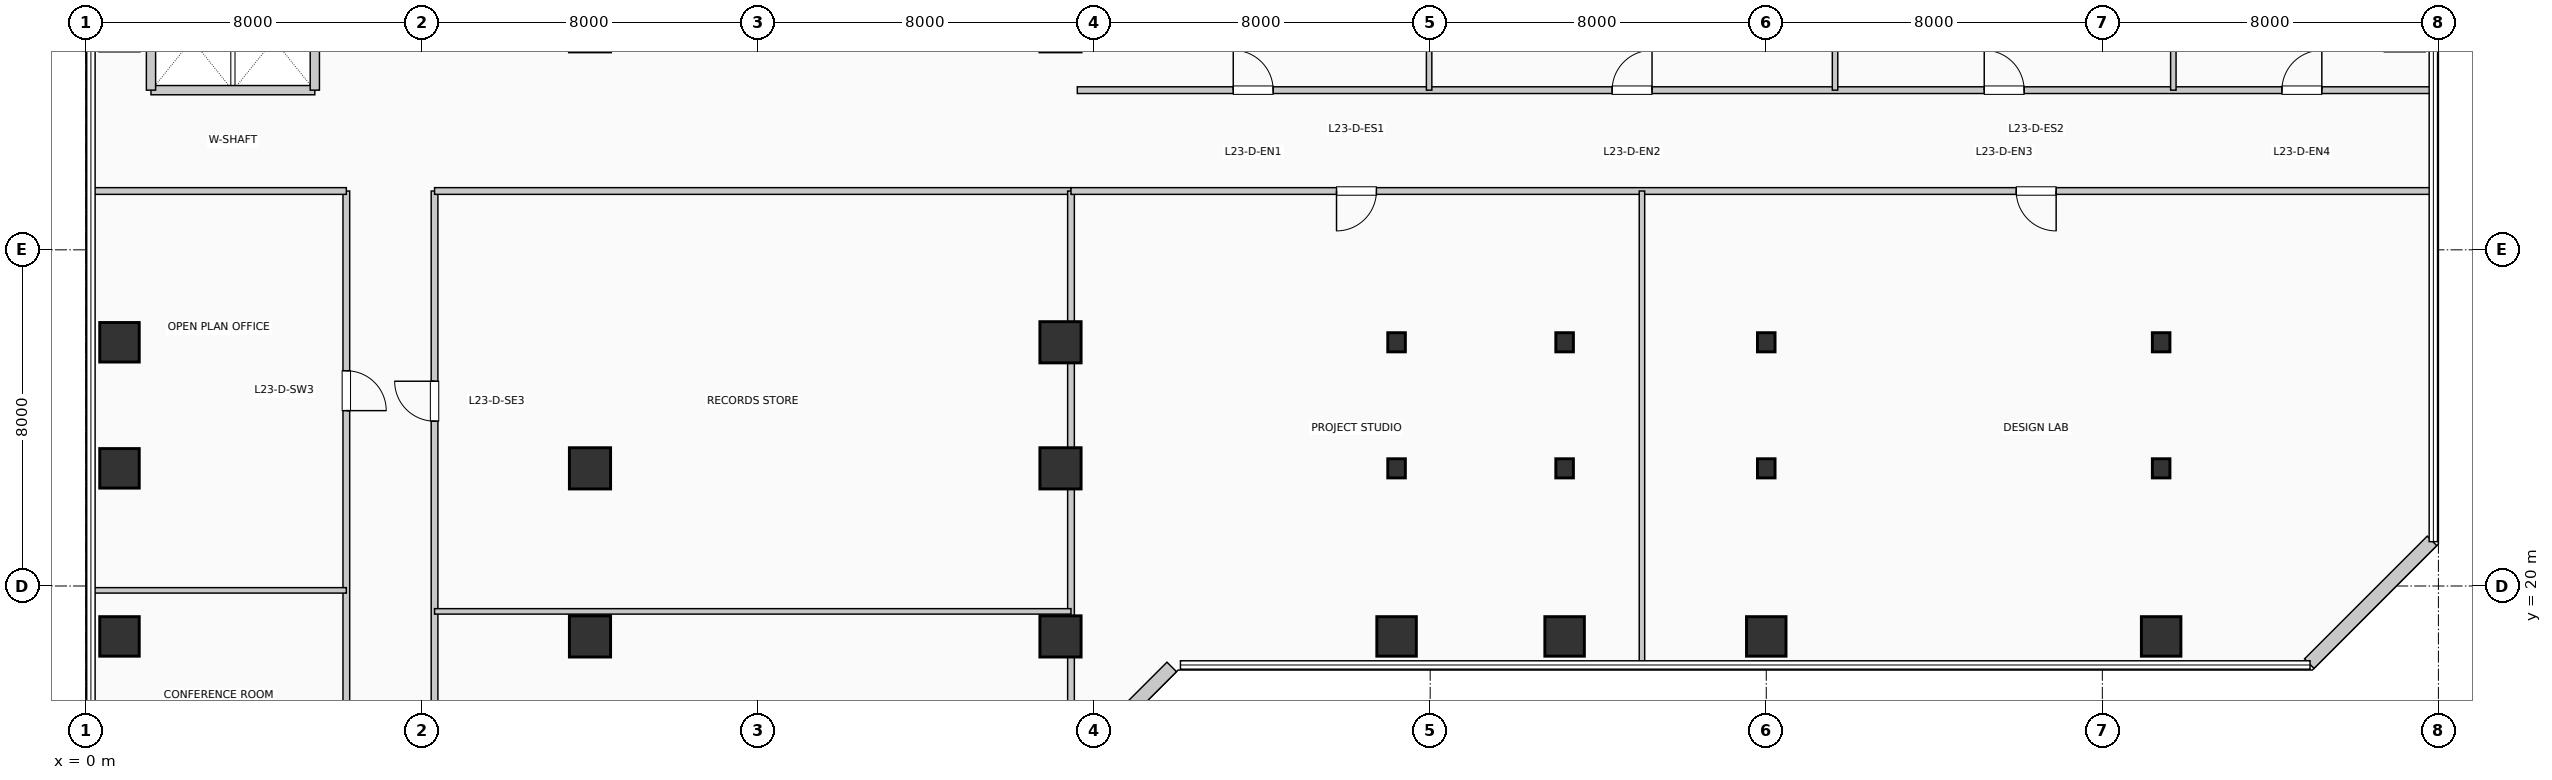
"""IFC4 building model, lengths in metres.
Left out: names, types, materials, properties, quantities, classifications, styles, units other than length and angle.
Written with IfcOpenShell. Run it as: python <this file> out.ifc"""

import sys

from ifc_helpers import new_model, si_unit, direction, frame, frame_2d, origin, origin_2d, place, context, subcontext, project, spatial, rectangle, i_section, extrude, element, fill, save


model = new_model("IFC4")
c1 = context("Model", 3, precision=1e-05, world=origin(), true_north=direction((0.0, 1.0)))
c2 = subcontext(c1, "Body", "Model", "MODEL_VIEW")
j1 = project(units=[si_unit("LENGTHUNIT", "METRE"), si_unit("PLANEANGLEUNIT", "RADIAN")], contexts=[c1])
p1 = place(None, origin())
s1 = spatial("IfcSite", under=j1, at=p1, CompositionType="ELEMENT")
p2 = place(p1, origin())
s2 = spatial("IfcBuilding", under=s1, at=p2, CompositionType="ELEMENT")
p3 = place(p2, frame((0.0, 0.0, 98.67)))
s3 = spatial("IfcBuildingStorey", under=s2, at=p3, CompositionType="ELEMENT", Elevation=98.67)
for number, where, z_axis, x_axis in (
    (1, (0.8, 18.8, 0.0), (0.0, 0.0, 1.0), (1.0, 0.0, 0.0)),
    (2, (0.8, 22.8, 0.0), (0.0, 0.0, 1.0), (1.0, 0.0, 0.0)),
    (3, (0.8, 25.8, 0.0), (0.0, 0.0, 1.0), (1.0, 0.0, 0.0)),
):
    element("IfcColumn", number, at=place(p3, frame(where, z_axis=z_axis, x_axis=x_axis)), inside=s3, PredefinedType="COLUMN", context=c2, shape_type="SweptSolid", body=[
        extrude(rectangle(XDim=0.94, YDim=0.94, at=origin_2d()), origin(), (0.0, 0.0, 1.0), 3.96),
    ])
for number, where, z_axis, x_axis in (
    (4, (12.0, 18.8, 0.0), (0.0, 0.0, 1.0), (1.0, 0.0, 0.0)),
    (5, (12.0, 22.8, 0.0), (0.0, 0.0, 1.0), (1.0, 0.0, 0.0)),
    (6, (23.2, 18.8, 0.0), (0.0, 0.0, 1.0), (1.0, 0.0, 0.0)),
    (7, (23.2, 22.8, 0.0), (0.0, 0.0, 1.0), (1.0, 0.0, 0.0)),
    (8, (23.2, 25.8, 0.0), (0.0, 0.0, 1.0), (1.0, 0.0, 0.0)),
):
    element("IfcColumn", number, at=place(p3, frame(where, z_axis=z_axis, x_axis=x_axis)), inside=s3, PredefinedType="COLUMN", context=c2, shape_type="SweptSolid", body=[
        extrude(rectangle(XDim=0.98, YDim=0.98, at=origin_2d()), origin(), (0.0, 0.0, 1.0), 3.96),
    ])
p4 = place(p3, frame((31.2, 18.8, 0.0), z_axis=(0.0, 0.0, 1.0), x_axis=(1.0, 0.0, 0.0)))
e9 = element("IfcColumn", 9, at=p4, inside=s3, PredefinedType="COLUMN", context=c2, shape_type="SweptSolid", body=[
    extrude(rectangle(XDim=0.94, YDim=0.94, at=origin_2d()), origin(), (0.0, 0.0, 1.0), 3.96),
])
for number, where, z_axis, x_axis in (
    (10, (31.2, 22.8, 0.0), (0.0, 0.0, 1.0), (1.0, 0.0, 0.0)),
    (11, (31.2, 25.8, 0.0), (0.0, 0.0, 1.0), (1.0, 0.0, 0.0)),
):
    element("IfcColumn", number, at=place(p3, frame(where, z_axis=z_axis, x_axis=x_axis)), inside=s3, PredefinedType="COLUMN", context=c2, shape_type="SweptSolid", body=[
        extrude(i_section(OverallWidth=0.418, OverallDepth=0.455, WebThickness=0.032, FlangeThickness=0.051, at=origin_2d()), origin(), (0.0, 0.0, 1.0), 3.96),
    ])
p5 = place(p3, frame((35.2, 18.8, 0.0), z_axis=(0.0, 0.0, 1.0), x_axis=(1.0, 0.0, 0.0)))
e12 = element("IfcColumn", 12, at=p5, inside=s3, PredefinedType="COLUMN", context=c2, shape_type="SweptSolid", body=[
    extrude(rectangle(XDim=0.94, YDim=0.94, at=origin_2d()), origin(), (0.0, 0.0, 1.0), 3.96),
])
for number, where, z_axis, x_axis in (
    (13, (35.2, 22.8, 0.0), (0.0, 0.0, 1.0), (1.0, 0.0, 0.0)),
    (14, (35.2, 25.8, 0.0), (0.0, 0.0, 1.0), (1.0, 0.0, 0.0)),
):
    element("IfcColumn", number, at=place(p3, frame(where, z_axis=z_axis, x_axis=x_axis)), inside=s3, PredefinedType="COLUMN", context=c2, shape_type="SweptSolid", body=[
        extrude(i_section(OverallWidth=0.418, OverallDepth=0.455, WebThickness=0.032, FlangeThickness=0.051, at=origin_2d()), origin(), (0.0, 0.0, 1.0), 3.96),
    ])
p6 = place(p3, frame((40.0, 18.8, 0.0), z_axis=(0.0, 0.0, 1.0), x_axis=(1.0, 0.0, 0.0)))
e15 = element("IfcColumn", 15, at=p6, inside=s3, PredefinedType="COLUMN", context=c2, shape_type="SweptSolid", body=[
    extrude(rectangle(XDim=0.94, YDim=0.94, at=origin_2d()), origin(), (0.0, 0.0, 1.0), 3.96),
])
for number, where, z_axis, x_axis in (
    (16, (40.0, 22.8, 0.0), (0.0, 0.0, 1.0), (1.0, 0.0, 0.0)),
    (17, (40.0, 25.8, 0.0), (0.0, 0.0, 1.0), (1.0, 0.0, 0.0)),
):
    element("IfcColumn", number, at=place(p3, frame(where, z_axis=z_axis, x_axis=x_axis)), inside=s3, PredefinedType="COLUMN", context=c2, shape_type="SweptSolid", body=[
        extrude(i_section(OverallWidth=0.418, OverallDepth=0.455, WebThickness=0.032, FlangeThickness=0.051, at=origin_2d()), origin(), (0.0, 0.0, 1.0), 3.96),
    ])
p7 = place(p3, frame((49.4, 18.8, 0.0), z_axis=(0.0, 0.0, 1.0), x_axis=(1.0, 0.0, 0.0)))
e18 = element("IfcColumn", 18, at=p7, inside=s3, PredefinedType="COLUMN", context=c2, shape_type="SweptSolid", body=[
    extrude(rectangle(XDim=0.94, YDim=0.94, at=origin_2d()), origin(), (0.0, 0.0, 1.0), 3.96),
])
for number, where, z_axis, x_axis in (
    (19, (49.4, 22.8, 0.0), (0.0, 0.0, 1.0), (1.0, 0.0, 0.0)),
    (20, (49.4, 25.8, 0.0), (0.0, 0.0, 1.0), (1.0, 0.0, 0.0)),
):
    element("IfcColumn", number, at=place(p3, frame(where, z_axis=z_axis, x_axis=x_axis)), inside=s3, PredefinedType="COLUMN", context=c2, shape_type="SweptSolid", body=[
        extrude(i_section(OverallWidth=0.418, OverallDepth=0.455, WebThickness=0.032, FlangeThickness=0.051, at=origin_2d()), origin(), (0.0, 0.0, 1.0), 3.96),
    ])
p8 = place(p3, frame((23.926, 16.152, 0.0), z_axis=(0.0, 0.0, 1.0), x_axis=(0.707106781187, 0.707106781187, 0.0)))
e21 = element("IfcWall", 21, at=p8, inside=s3, PredefinedType="SOLIDWALL", context=c2, shape_type="SweptSolid", body=[
    extrude(rectangle(XDim=2.718, YDim=0.32, at=frame_2d((1.359, 0.0))), origin(), (0.0, 0.0, 1.0), 3.71),
])
p9 = place(p3, frame((52.926, 18.152, 0.0), z_axis=(0.0, 0.0, 1.0), x_axis=(0.707106781187, 0.707106781187, 0.0)))
e22 = element("IfcWall", 22, at=p9, inside=s3, PredefinedType="SOLIDWALL", context=c2, shape_type="SweptSolid", body=[
    extrude(rectangle(XDim=4.133, YDim=0.32, at=frame_2d((2.066, 0.0))), origin(), (0.0, 0.0, 1.0), 3.71),
])
p10 = place(p3, frame((1.55, 31.8, 0.0), z_axis=(0.0, 0.0, 1.0), x_axis=(1.0, 0.0, 0.0)))
e23 = element("IfcWall", 23, at=p10, inside=s3, PredefinedType="PARTITIONING", context=c2, shape_type="SweptSolid", body=[
    extrude(rectangle(XDim=3.9, YDim=0.22, at=frame_2d((1.95, 0.0))), origin(), (0.0, 0.0, 1.0), 3.71),
])
for number, where, z_axis, x_axis in (
    (24, (1.55, 31.8, 0.0), (0.0, 0.0, 1.0), (0.0, 1.0, 0.0)),
    (25, (5.45, 31.8, 0.0), (0.0, 0.0, 1.0), (0.0, 1.0, 0.0)),
):
    element("IfcWall", number, at=place(p3, frame(where, z_axis=z_axis, x_axis=x_axis)), inside=s3, PredefinedType="PARTITIONING", context=c2, shape_type="SweptSolid", body=[
        extrude(rectangle(XDim=2.38, YDim=0.22, at=frame_2d((1.19, 0.0))), origin(), (0.0, 0.0, 1.0), 3.71),
    ])
p11 = place(p3, frame((6.2, 4.39, 0.0), z_axis=(0.0, 0.0, 1.0), x_axis=(0.0, 1.0, 0.0)))
e26 = element("IfcWall", 26, at=p11, inside=s3, PredefinedType="PARTITIONING", context=c2, shape_type="SweptSolid", body=[
    extrude(rectangle(XDim=25.01, YDim=0.16, at=frame_2d((12.505, 0.0))), origin(), (0.0, 0.0, 1.0), 3.71),
])
p12 = place(p11, frame((4.227, 0.0, 0.0), z_axis=(0.0, 0.0, 1.0), x_axis=(-1.0, 0.0, 0.0)))
e27 = element("IfcOpeningElement", 27, at=p12, cuts=e26, PredefinedType="OPENING", context=c2, shape_type="SweptSolid", body=[
    extrude(rectangle(XDim=0.95, YDim=2.15, at=frame_2d((0.475, 1.075))), frame((0.0, 0.09, 0.0), z_axis=(0.0, -1.0, 0.0), x_axis=(1.0, 0.0, 0.0)), (0.0, 0.0, 1.0), 0.18),
])
p13 = place(p11, frame((11.979, 0.0, 0.0), z_axis=(0.0, 0.0, 1.0), x_axis=(-1.0, 0.0, 0.0)))
e28 = element("IfcOpeningElement", 28, at=p13, cuts=e26, PredefinedType="OPENING", context=c2, shape_type="SweptSolid", body=[
    extrude(rectangle(XDim=0.95, YDim=2.15, at=frame_2d((0.475, 1.075))), frame((0.0, 0.09, 0.0), z_axis=(0.0, -1.0, 0.0), x_axis=(1.0, 0.0, 0.0)), (0.0, 0.0, 1.0), 0.18),
])
p14 = place(p11, frame((20.733, 0.0, 0.0), z_axis=(0.0, 0.0, 1.0), x_axis=(-1.0, 0.0, 0.0)))
e29 = element("IfcOpeningElement", 29, at=p14, cuts=e26, PredefinedType="OPENING", context=c2, shape_type="SweptSolid", body=[
    extrude(rectangle(XDim=0.95, YDim=2.15, at=frame_2d((0.475, 1.075))), frame((0.0, 0.09, 0.0), z_axis=(0.0, -1.0, 0.0), x_axis=(1.0, 0.0, 0.0)), (0.0, 0.0, 1.0), 0.18),
])
p15 = place(p3, frame((8.3, 4.39, 0.0), z_axis=(0.0, 0.0, 1.0), x_axis=(0.0, 1.0, 0.0)))
e30 = element("IfcWall", 30, at=p15, inside=s3, PredefinedType="PARTITIONING", context=c2, shape_type="SweptSolid", body=[
    extrude(rectangle(XDim=25.01, YDim=0.16, at=frame_2d((12.505, 0.0))), origin(), (0.0, 0.0, 1.0), 3.71),
])
p16 = place(p15, frame((3.026, 0.0, 0.0)))
e31 = element("IfcOpeningElement", 31, at=p16, cuts=e30, PredefinedType="OPENING", context=c2, shape_type="SweptSolid", body=[
    extrude(rectangle(XDim=0.95, YDim=2.15, at=frame_2d((0.475, 1.075))), frame((0.0, 0.09, 0.0), z_axis=(0.0, -1.0, 0.0), x_axis=(1.0, 0.0, 0.0)), (0.0, 0.0, 1.0), 0.18),
])
p17 = place(p15, frame((10.529, 0.0, 0.0)))
e32 = element("IfcOpeningElement", 32, at=p17, cuts=e30, PredefinedType="OPENING", context=c2, shape_type="SweptSolid", body=[
    extrude(rectangle(XDim=0.95, YDim=2.15, at=frame_2d((0.475, 1.075))), frame((0.0, 0.09, 0.0), z_axis=(0.0, -1.0, 0.0), x_axis=(1.0, 0.0, 0.0)), (0.0, 0.0, 1.0), 0.18),
])
p18 = place(p15, frame((19.533, 0.0, 0.0)))
e33 = element("IfcOpeningElement", 33, at=p18, cuts=e30, PredefinedType="OPENING", context=c2, shape_type="SweptSolid", body=[
    extrude(rectangle(XDim=0.95, YDim=2.15, at=frame_2d((0.475, 1.075))), frame((0.0, 0.09, 0.0), z_axis=(0.0, -1.0, 0.0), x_axis=(1.0, 0.0, 0.0)), (0.0, 0.0, 1.0), 0.18),
])
p19 = place(p3, frame((0.19, 29.4, 0.0), z_axis=(0.0, 0.0, 1.0), x_axis=(1.0, 0.0, 0.0)))
e34 = element("IfcWall", 34, at=p19, inside=s3, PredefinedType="PARTITIONING", context=c2, shape_type="SweptSolid", body=[
    extrude(rectangle(XDim=6.01, YDim=0.16, at=frame_2d((3.005, 0.0))), origin(), (0.0, 0.0, 1.0), 3.365),
])
p20 = place(p3, frame((8.3, 29.4, 0.0), z_axis=(0.0, 0.0, 1.0), x_axis=(1.0, 0.0, 0.0)))
e35 = element("IfcWall", 35, at=p20, inside=s3, PredefinedType="PARTITIONING", context=c2, shape_type="SweptSolid", body=[
    extrude(rectangle(XDim=15.15, YDim=0.16, at=frame_2d((7.575, 0.0))), origin(), (0.0, 0.0, 1.0), 3.365),
])
p21 = place(p3, frame((23.45, 0.19, 0.0), z_axis=(0.0, 0.0, 1.0), x_axis=(0.0, 1.0, 0.0)))
e36 = element("IfcWall", 36, at=p21, inside=s3, PredefinedType="PARTITIONING", context=c2, shape_type="SweptSolid", body=[
    extrude(rectangle(XDim=29.21, YDim=0.16, at=frame_2d((14.605, 0.0))), origin(), (0.0, 0.0, 1.0), 2.995),
])
p22 = place(p3, frame((0.19, 19.896, 0.0), z_axis=(0.0, 0.0, 1.0), x_axis=(1.0, 0.0, 0.0)))
e37 = element("IfcWall", 37, at=p22, inside=s3, PredefinedType="PARTITIONING", context=c2, shape_type="SweptSolid", body=[
    extrude(rectangle(XDim=6.01, YDim=0.13, at=frame_2d((3.005, 0.0))), origin(), (0.0, 0.0, 1.0), 3.71),
])
p23 = place(p3, frame((8.3, 19.396, 0.0), z_axis=(0.0, 0.0, 1.0), x_axis=(1.0, 0.0, 0.0)))
e38 = element("IfcWall", 38, at=p23, inside=s3, PredefinedType="PARTITIONING", context=c2, shape_type="SweptSolid", body=[
    extrude(rectangle(XDim=15.15, YDim=0.13, at=frame_2d((7.575, 0.0))), origin(), (0.0, 0.0, 1.0), 3.71),
])
p24 = place(p3, frame((23.45, 29.4, 0.0), z_axis=(0.0, 0.0, 1.0), x_axis=(1.0, 0.0, 0.0)))
e39 = element("IfcWall", 39, at=p24, inside=s3, PredefinedType="PARTITIONING", context=c2, shape_type="SweptSolid", body=[
    extrude(rectangle(XDim=32.36, YDim=0.16, at=frame_2d((16.18, 0.0))), origin(), (0.0, 0.0, 1.0), 3.365),
])
p25 = place(p24, frame((7.271, 0.0, 0.0), z_axis=(0.0, 0.0, 1.0), x_axis=(-1.0, 0.0, 0.0)))
e40 = element("IfcOpeningElement", 40, at=p25, cuts=e39, PredefinedType="OPENING", context=c2, shape_type="SweptSolid", body=[
    extrude(rectangle(XDim=0.95, YDim=2.15, at=frame_2d((0.475, 1.075))), frame((0.0, 0.09, 0.0), z_axis=(0.0, -1.0, 0.0), x_axis=(1.0, 0.0, 0.0)), (0.0, 0.0, 1.0), 0.18),
])
p26 = place(p24, frame((23.45, 0.0, 0.0), z_axis=(0.0, 0.0, 1.0), x_axis=(-1.0, 0.0, 0.0)))
e41 = element("IfcOpeningElement", 41, at=p26, cuts=e39, PredefinedType="OPENING", context=c2, shape_type="SweptSolid", body=[
    extrude(rectangle(XDim=0.95, YDim=2.15, at=frame_2d((0.475, 1.075))), frame((0.0, 0.09, 0.0), z_axis=(0.0, -1.0, 0.0), x_axis=(1.0, 0.0, 0.0)), (0.0, 0.0, 1.0), 0.18),
])
p27 = place(p3, frame((23.6, 31.8, 0.0), z_axis=(0.0, 0.0, 1.0), x_axis=(1.0, 0.0, 0.0)))
e42 = element("IfcWall", 42, at=p27, inside=s3, PredefinedType="PARTITIONING", context=c2, shape_type="SweptSolid", body=[
    extrude(rectangle(XDim=32.21, YDim=0.16, at=frame_2d((16.105, 0.0))), origin(), (0.0, 0.0, 1.0), 3.71),
])
p28 = place(p27, frame((3.712, 0.0, 0.0)))
e43 = element("IfcOpeningElement", 43, at=p28, cuts=e42, PredefinedType="OPENING", context=c2, shape_type="SweptSolid", body=[
    extrude(rectangle(XDim=0.95, YDim=2.15, at=frame_2d((0.475, 1.075))), frame((0.0, 0.09, 0.0), z_axis=(0.0, -1.0, 0.0), x_axis=(1.0, 0.0, 0.0)), (0.0, 0.0, 1.0), 0.18),
])
p29 = place(p27, frame((12.731, 0.0, 0.0)))
e44 = element("IfcOpeningElement", 44, at=p29, cuts=e42, PredefinedType="OPENING", context=c2, shape_type="SweptSolid", body=[
    extrude(rectangle(XDim=0.95, YDim=2.15, at=frame_2d((0.475, 1.075))), frame((0.0, 0.09, 0.0), z_axis=(0.0, -1.0, 0.0), x_axis=(1.0, 0.0, 0.0)), (0.0, 0.0, 1.0), 0.18),
])
p30 = place(p27, frame((21.589, 0.0, 0.0)))
e45 = element("IfcOpeningElement", 45, at=p30, cuts=e42, PredefinedType="OPENING", context=c2, shape_type="SweptSolid", body=[
    extrude(rectangle(XDim=0.95, YDim=2.15, at=frame_2d((0.475, 1.075))), frame((0.0, 0.09, 0.0), z_axis=(0.0, -1.0, 0.0), x_axis=(1.0, 0.0, 0.0)), (0.0, 0.0, 1.0), 0.18),
])
p31 = place(p27, frame((28.675, 0.0, 0.0)))
e46 = element("IfcOpeningElement", 46, at=p31, cuts=e42, PredefinedType="OPENING", context=c2, shape_type="SweptSolid", body=[
    extrude(rectangle(XDim=0.95, YDim=2.15, at=frame_2d((0.475, 1.075))), frame((0.0, 0.09, 0.0), z_axis=(0.0, -1.0, 0.0), x_axis=(1.0, 0.0, 0.0)), (0.0, 0.0, 1.0), 0.18),
])
p32 = place(p3, frame((37.041, 18.19, 0.0), z_axis=(0.0, 0.0, 1.0), x_axis=(0.0, 1.0, 0.0)))
e47 = element("IfcWall", 47, at=p32, inside=s3, PredefinedType="PARTITIONING", context=c2, shape_type="SweptSolid", body=[
    extrude(rectangle(XDim=11.21, YDim=0.13, at=frame_2d((5.605, 0.0))), origin(), (0.0, 0.0, 1.0), 3.71),
])
for number, where, z_axis, x_axis in (
    (48, (31.975, 31.8, 0.0), (0.0, 0.0, 1.0), (0.0, 1.0, 0.0)),
    (49, (41.638, 31.8, 0.0), (0.0, 0.0, 1.0), (0.0, 1.0, 0.0)),
):
    element("IfcWall", number, at=place(p3, frame(where, z_axis=z_axis, x_axis=x_axis)), inside=s3, PredefinedType="PARTITIONING", context=c2, shape_type="SweptSolid", body=[
        extrude(rectangle(XDim=14.01, YDim=0.13, at=frame_2d((7.005, 0.0))), origin(), (0.0, 0.0, 1.0), 3.71),
    ])
p33 = place(p3, frame((49.69, 31.8, 0.0), z_axis=(0.0, 0.0, 1.0), x_axis=(0.0, 1.0, 0.0)))
e50 = element("IfcWall", 50, at=p33, inside=s3, PredefinedType="PARTITIONING", context=c2, shape_type="SweptSolid", body=[
    extrude(rectangle(XDim=14.01, YDim=0.13, at=frame_2d((7.005, 0.0))), origin(), (0.0, 0.0, 1.0), 2.995),
])
p34 = place(p14, origin())
e51 = element("IfcDoor", 51, at=p34, inside=s3, OperationType="SINGLE_SWING_LEFT", PredefinedType="DOOR", context=c2, shape_type="SweptSolid", body=[
    extrude(rectangle(XDim=0.95, YDim=2.15, at=frame_2d((0.475, 1.075))), frame((0.0, 0.025, 0.0), z_axis=(0.0, -1.0, 0.0), x_axis=(1.0, 0.0, 0.0)), (0.0, 0.0, 1.0), 0.05),
])
fill(e29, e51)
p35 = place(p18, origin())
e52 = element("IfcDoor", 52, at=p35, inside=s3, OperationType="SINGLE_SWING_RIGHT", PredefinedType="DOOR", context=c2, shape_type="SweptSolid", body=[
    extrude(rectangle(XDim=0.95, YDim=2.15, at=frame_2d((0.475, 1.075))), frame((0.0, 0.025, 0.0), z_axis=(0.0, -1.0, 0.0), x_axis=(1.0, 0.0, 0.0)), (0.0, 0.0, 1.0), 0.05),
])
fill(e33, e52)
p36 = place(p25, origin())
e53 = element("IfcDoor", 53, at=p36, inside=s3, OperationType="SINGLE_SWING_LEFT", PredefinedType="DOOR", context=c2, shape_type="SweptSolid", body=[
    extrude(rectangle(XDim=0.95, YDim=2.15, at=frame_2d((0.475, 1.075))), frame((0.0, 0.025, 0.0), z_axis=(0.0, -1.0, 0.0), x_axis=(1.0, 0.0, 0.0)), (0.0, 0.0, 1.0), 0.05),
])
fill(e40, e53)
p37 = place(p26, origin())
e54 = element("IfcDoor", 54, at=p37, inside=s3, OperationType="SINGLE_SWING_RIGHT", PredefinedType="DOOR", context=c2, shape_type="SweptSolid", body=[
    extrude(rectangle(XDim=0.95, YDim=2.15, at=frame_2d((0.475, 1.075))), frame((0.0, 0.025, 0.0), z_axis=(0.0, -1.0, 0.0), x_axis=(1.0, 0.0, 0.0)), (0.0, 0.0, 1.0), 0.05),
])
fill(e41, e54)
p38 = place(p28, origin())
e55 = element("IfcDoor", 55, at=p38, inside=s3, OperationType="SINGLE_SWING_LEFT", PredefinedType="DOOR", context=c2, shape_type="SweptSolid", body=[
    extrude(rectangle(XDim=0.95, YDim=2.15, at=frame_2d((0.475, 1.075))), frame((0.0, 0.025, 0.0), z_axis=(0.0, -1.0, 0.0), x_axis=(1.0, 0.0, 0.0)), (0.0, 0.0, 1.0), 0.05),
])
fill(e43, e55)
p39 = place(p29, origin())
e56 = element("IfcDoor", 56, at=p39, inside=s3, OperationType="SINGLE_SWING_RIGHT", PredefinedType="DOOR", context=c2, shape_type="SweptSolid", body=[
    extrude(rectangle(XDim=0.95, YDim=2.15, at=frame_2d((0.475, 1.075))), frame((0.0, 0.025, 0.0), z_axis=(0.0, -1.0, 0.0), x_axis=(1.0, 0.0, 0.0)), (0.0, 0.0, 1.0), 0.05),
])
fill(e44, e56)
p40 = place(p30, origin())
e57 = element("IfcDoor", 57, at=p40, inside=s3, OperationType="SINGLE_SWING_LEFT", PredefinedType="DOOR", context=c2, shape_type="SweptSolid", body=[
    extrude(rectangle(XDim=0.95, YDim=2.15, at=frame_2d((0.475, 1.075))), frame((0.0, 0.025, 0.0), z_axis=(0.0, -1.0, 0.0), x_axis=(1.0, 0.0, 0.0)), (0.0, 0.0, 1.0), 0.05),
])
fill(e45, e57)
p41 = place(p31, origin())
e58 = element("IfcDoor", 58, at=p41, inside=s3, OperationType="SINGLE_SWING_RIGHT", PredefinedType="DOOR", context=c2, shape_type="SweptSolid", body=[
    extrude(rectangle(XDim=0.95, YDim=2.15, at=frame_2d((0.475, 1.075))), frame((0.0, 0.025, 0.0), z_axis=(0.0, -1.0, 0.0), x_axis=(1.0, 0.0, 0.0)), (0.0, 0.0, 1.0), 0.05),
])
fill(e46, e58)
save(model, sys.argv[1])
